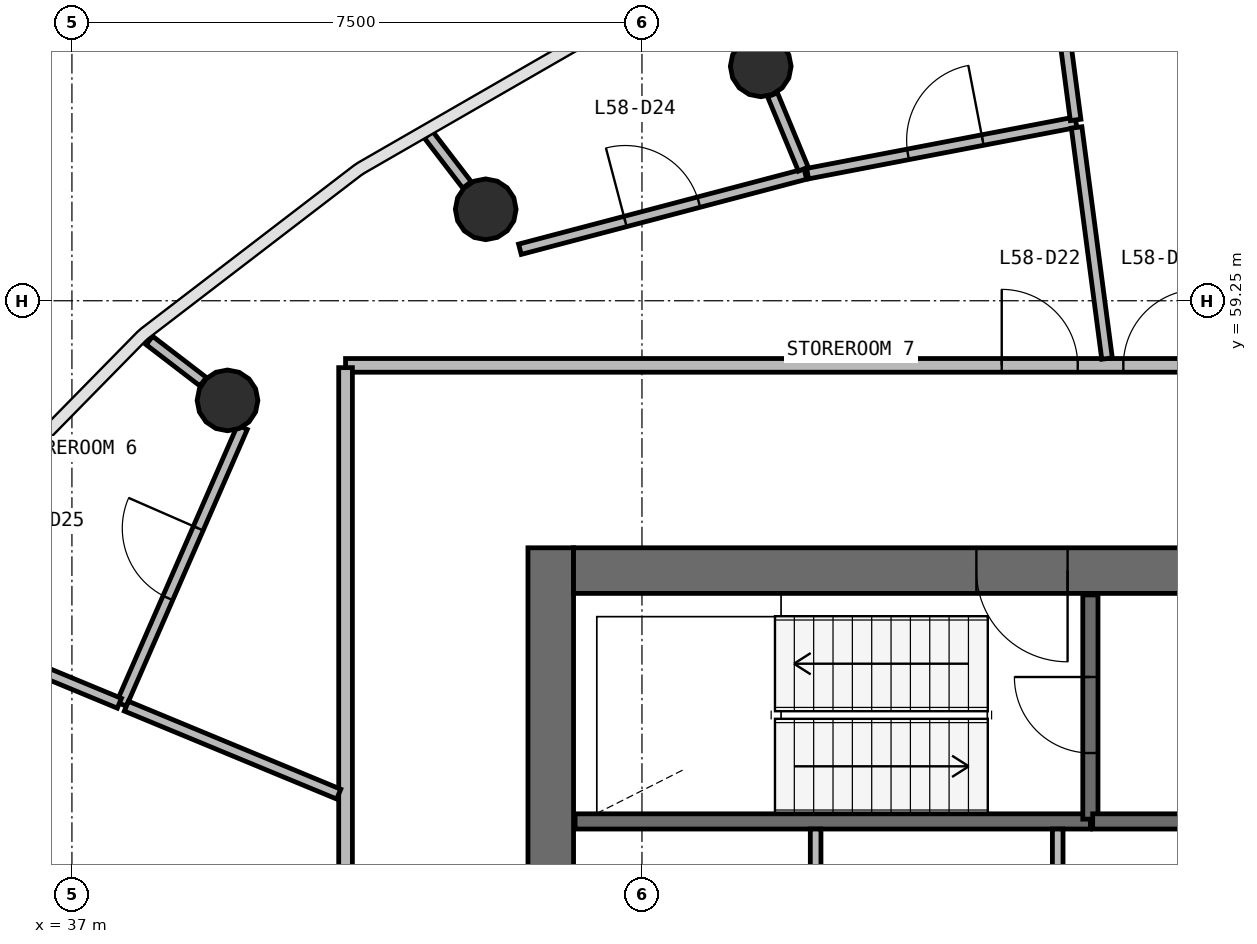
"""IFC4 building model, lengths in metres.
Left out: names, types, materials, properties, quantities, classifications, styles, units other than length and angle.
Written with IfcOpenShell. Run it as: python <this file> out.ifc"""

import sys

from ifc_helpers import new_model, si_unit, direction, frame, frame_2d, origin, origin_2d, place, context, subcontext, project, spatial, rectangle, circle, extrude, source, transform, mapped, element, fill, save


model = new_model("IFC4")
c1 = context("Model", 3, precision=1e-05, world=origin(), true_north=direction((0.0, 1.0)))
c2 = subcontext(c1, "Body", "Model", "MODEL_VIEW")
j1 = project(units=[si_unit("LENGTHUNIT", "METRE"), si_unit("PLANEANGLEUNIT", "RADIAN")], contexts=[c1])
p1 = place(None, origin())
s1 = spatial("IfcSite", under=j1, at=p1, CompositionType="ELEMENT")
p2 = place(p1, origin())
s2 = spatial("IfcBuilding", under=s1, at=p2, CompositionType="ELEMENT")
p3 = place(p2, frame((0.0, 0.0, 238.4)))
s3 = spatial("IfcBuildingStorey", under=s2, at=p3, CompositionType="ELEMENT", Elevation=238.4)
p4 = place(p3, frame((43.3, 56.0, 0.0), z_axis=(0.0, 0.0, 1.0), x_axis=(0.0, -1.0, 0.0)))
e1 = element("IfcWall", 1, at=p4, inside=s3, PredefinedType="SHEAR", context=c2, shape_type="SweptSolid", body=[
    extrude(rectangle(XDim=16.0, YDim=0.6, at=frame_2d((8.0, 0.0))), origin(), (0.0, 0.0, 1.0), 3.9),
])
p5 = place(p4, frame((7.1, 0.0, 0.0)))
e2 = element("IfcOpeningElement", 2, at=p5, cuts=e1, PredefinedType="OPENING", context=c2, shape_type="SweptSolid", body=[
    extrude(rectangle(XDim=1.8, YDim=2.1, at=frame_2d((0.9, 1.05))), frame((0.0, 0.31, 0.0), z_axis=(0.0, -1.0, 0.0), x_axis=(1.0, 0.0, 0.0)), (0.0, 0.0, 1.0), 0.62),
])
p6 = place(p3, frame((60.4, 55.7, 0.0), z_axis=(0.0, 0.0, 1.0), x_axis=(-1.0, 0.0, 0.0)))
e3 = element("IfcWall", 3, at=p6, inside=s3, PredefinedType="SHEAR", context=c2, shape_type="SweptSolid", body=[
    extrude(rectangle(XDim=16.8, YDim=0.6, at=frame_2d((8.4, 0.0))), origin(), (0.0, 0.0, 1.0), 3.9),
])
p7 = place(p6, frame((0.4, 0.0, 0.0)))
e4 = element("IfcOpeningElement", 4, at=p7, cuts=e3, PredefinedType="OPENING", context=c2, shape_type="SweptSolid", body=[
    extrude(rectangle(XDim=1.1, YDim=2.1, at=frame_2d((0.55, 1.05))), frame((0.0, 0.31, 0.0), z_axis=(0.0, -1.0, 0.0), x_axis=(1.0, 0.0, 0.0)), (0.0, 0.0, 1.0), 0.62),
])
p8 = place(p6, frame((10.3, 0.0, 0.0)))
e5 = element("IfcOpeningElement", 5, at=p8, cuts=e3, PredefinedType="OPENING", context=c2, shape_type="SweptSolid", body=[
    extrude(rectangle(XDim=1.2, YDim=2.1, at=frame_2d((0.6, 1.05))), frame((0.0, 0.31, 0.0), z_axis=(0.0, -1.0, 0.0), x_axis=(1.0, 0.0, 0.0)), (0.0, 0.0, 1.0), 0.62),
])
p9 = place(p6, frame((7.25, 0.0, 0.0)))
e6 = element("IfcOpeningElement", 6, at=p9, cuts=e3, PredefinedType="OPENING", context=c2, shape_type="SweptSolid", body=[
    extrude(rectangle(XDim=1.1, YDim=2.1, at=frame_2d((0.55, 1.05))), frame((0.0, 0.31, 0.0), z_axis=(0.0, -1.0, 0.0), x_axis=(1.0, 0.0, 0.0)), (0.0, 0.0, 1.0), 0.62),
])
m1 = source(origin(), c2, "Body", "SweptSolid", [
    extrude(circle(Radius=0.4, at=origin_2d()), origin(), (0.0, 0.0, 1.0), 3.9),
])
for number, where, z_axis, x_axis in (
    (7, (46.063, 62.334, 0.0), (0.0, 0.0, 1.0), (1.0, 0.0, 0.0)),
    (8, (42.444, 60.453, 0.0), (0.0, 0.0, 1.0), (1.0, 0.0, 0.0)),
    (9, (39.047, 57.939, 0.0), (0.0, 0.0, 1.0), (1.0, 0.0, 0.0)),
):
    element("IfcColumn", number, at=place(p3, frame(where, z_axis=z_axis, x_axis=x_axis)), inside=s3, PredefinedType="COLUMN", context=c2, shape_type="MappedRepresentation", body=[
        mapped(m1, transform((0.0, 0.0, 0.0), scale=1.0)),
    ])
p10 = place(p3, frame((43.62, 52.4, 0.0), z_axis=(0.0, 0.0, 1.0), x_axis=(1.0, 0.0, 0.0)))
e10 = element("IfcWall", 10, at=p10, inside=s3, PredefinedType="SOLIDWALL", context=c2, shape_type="SweptSolid", body=[
    extrude(rectangle(XDim=6.78, YDim=0.2, at=frame_2d((3.39, 0.0))), origin(), (0.0, 0.0, 1.0), 3.58),
])
p11 = place(p3, frame((50.4, 52.43, 0.0), z_axis=(0.0, 0.0, 1.0), x_axis=(0.0, 1.0, 0.0)))
e11 = element("IfcWall", 11, at=p11, inside=s3, PredefinedType="SOLIDWALL", context=c2, shape_type="SweptSolid", body=[
    extrude(rectangle(XDim=2.95, YDim=0.2, at=frame_2d((1.475, 0.0))), origin(), (0.0, 0.0, 1.0), 3.58),
])
p12 = place(p11, frame((0.87, 0.0, 0.0)))
e12 = element("IfcOpeningElement", 12, at=p12, cuts=e11, PredefinedType="OPENING", context=c2, shape_type="SweptSolid", body=[
    extrude(rectangle(XDim=1.0, YDim=2.1, at=frame_2d((0.5, 1.05))), frame((0.0, 0.11, 0.0), z_axis=(0.0, -1.0, 0.0), x_axis=(1.0, 0.0, 0.0)), (0.0, 0.0, 1.0), 0.22),
])
p13 = place(p3, frame((50.43, 52.4, 0.0), z_axis=(0.0, 0.0, 1.0), x_axis=(1.0, 0.0, 0.0)))
e13 = element("IfcWall", 13, at=p13, inside=s3, PredefinedType="SOLIDWALL", context=c2, shape_type="SweptSolid", body=[
    extrude(rectangle(XDim=2.24, YDim=0.2, at=frame_2d((1.12, 0.0))), origin(), (0.0, 0.0, 1.0), 3.58),
])
p14 = place(p3, frame((40.6, 58.4, 0.0), z_axis=(0.0, 0.0, 1.0), x_axis=(1.0, 0.0, 0.0)))
e14 = element("IfcWall", 14, at=p14, inside=s3, PredefinedType="PARTITIONING", context=c2, shape_type="SweptSolid", body=[
    extrude(rectangle(XDim=21.483, YDim=0.18, at=frame_2d((10.742, 0.0))), origin(), (0.0, 0.0, 1.0), 2.88),
])
p15 = place(p14, frame((10.233, 0.0, 0.0)))
e15 = element("IfcOpeningElement", 15, at=p15, cuts=e14, PredefinedType="OPENING", context=c2, shape_type="SweptSolid", body=[
    extrude(rectangle(XDim=1.0, YDim=2.1, at=frame_2d((0.5, 1.05))), frame((0.0, 0.1, 0.0), z_axis=(0.0, -1.0, 0.0), x_axis=(1.0, 0.0, 0.0)), (0.0, 0.0, 1.0), 0.2),
])
p16 = place(p14, frame((8.634, 0.0, 0.0)))
e16 = element("IfcOpeningElement", 16, at=p16, cuts=e14, PredefinedType="OPENING", context=c2, shape_type="SweptSolid", body=[
    extrude(rectangle(XDim=1.0, YDim=2.1, at=frame_2d((0.5, 1.05))), frame((0.0, 0.1, 0.0), z_axis=(0.0, -1.0, 0.0), x_axis=(1.0, 0.0, 0.0)), (0.0, 0.0, 1.0), 0.2),
])
p17 = place(p3, frame((40.6, 37.63, 0.0), z_axis=(0.0, 0.0, 1.0), x_axis=(0.0, 1.0, 0.0)))
e17 = element("IfcWall", 17, at=p17, inside=s3, PredefinedType="PARTITIONING", context=c2, shape_type="SweptSolid", body=[
    extrude(rectangle(XDim=20.74, YDim=0.18, at=frame_2d((10.37, 0.0))), origin(), (0.0, 0.0, 1.0), 2.88),
])
p18 = place(p17, frame((9.89, 0.0, 0.0)))
e18 = element("IfcOpeningElement", 18, at=p18, cuts=e17, PredefinedType="OPENING", context=c2, shape_type="SweptSolid", body=[
    extrude(rectangle(XDim=1.0, YDim=2.1, at=frame_2d((0.5, 1.05))), frame((0.0, 0.1, 0.0), z_axis=(0.0, -1.0, 0.0), x_axis=(1.0, 0.0, 0.0)), (0.0, 0.0, 1.0), 0.2),
])
p19 = place(p17, frame((4.29, 0.0, 0.0)))
e19 = element("IfcOpeningElement", 19, at=p19, cuts=e17, PredefinedType="OPENING", context=c2, shape_type="SweptSolid", body=[
    extrude(rectangle(XDim=1.0, YDim=2.1, at=frame_2d((0.5, 1.05))), frame((0.0, 0.1, 0.0), z_axis=(0.0, -1.0, 0.0), x_axis=(1.0, 0.0, 0.0)), (0.0, 0.0, 1.0), 0.2),
])
p20 = place(p3, frame((37.652, 53.943, 0.0), z_axis=(0.0, 0.0, 1.0), x_axis=(0.400345057701, 0.916364466124, 0.0)))
e20 = element("IfcWall", 20, at=p20, inside=s3, PredefinedType="PARTITIONING", context=c2, shape_type="SweptSolid", body=[
    extrude(rectangle(XDim=3.974, YDim=0.14, at=frame_2d((1.987, 0.0))), origin(), (0.0, 0.0, 1.0), 2.88),
])
p21 = place(p20, frame((1.524, 0.0, 0.0)))
e21 = element("IfcOpeningElement", 21, at=p21, cuts=e20, PredefinedType="OPENING", context=c2, shape_type="SweptSolid", body=[
    extrude(rectangle(XDim=1.0, YDim=2.1, at=frame_2d((0.5, 1.05))), frame((0.0, 0.08, 0.0), z_axis=(0.0, -1.0, 0.0), x_axis=(1.0, 0.0, 0.0)), (0.0, 0.0, 1.0), 0.16),
])
p22 = place(p3, frame((42.894, 59.927, 0.0), z_axis=(0.0, 0.0, 1.0), x_axis=(0.967030550889, 0.254660388848, 0.0)))
e22 = element("IfcWall", 22, at=p22, inside=s3, PredefinedType="PARTITIONING", context=c2, shape_type="SweptSolid", body=[
    extrude(rectangle(XDim=3.884, YDim=0.14, at=frame_2d((1.942, 0.0))), origin(), (0.0, 0.0, 1.0), 2.88),
])
p23 = place(p22, frame((1.434, 0.0, 0.0)))
e23 = element("IfcOpeningElement", 23, at=p23, cuts=e22, PredefinedType="OPENING", context=c2, shape_type="SweptSolid", body=[
    extrude(rectangle(XDim=1.0, YDim=2.1, at=frame_2d((0.5, 1.05))), frame((0.0, 0.08, 0.0), z_axis=(0.0, -1.0, 0.0), x_axis=(1.0, 0.0, 0.0)), (0.0, 0.0, 1.0), 0.16),
])
p24 = place(p3, frame((46.679, 60.922, 0.0), z_axis=(0.0, 0.0, 1.0), x_axis=(0.982106581233, 0.188325949088, 0.0)))
e24 = element("IfcWall", 24, at=p24, inside=s3, PredefinedType="PARTITIONING", context=c2, shape_type="SweptSolid", body=[
    extrude(rectangle(XDim=3.595, YDim=0.14, at=frame_2d((1.797, 0.0))), origin(), (0.0, 0.0, 1.0), 2.88),
])
p25 = place(p24, frame((1.345, 0.0, 0.0)))
e25 = element("IfcOpeningElement", 25, at=p25, cuts=e24, PredefinedType="OPENING", context=c2, shape_type="SweptSolid", body=[
    extrude(rectangle(XDim=1.0, YDim=2.1, at=frame_2d((0.5, 1.05))), frame((0.0, 0.08, 0.0), z_axis=(0.0, -1.0, 0.0), x_axis=(1.0, 0.0, 0.0)), (0.0, 0.0, 1.0), 0.16),
])
p26 = place(p3, frame((50.619, 58.49, 0.0), z_axis=(0.0, 0.0, 1.0), x_axis=(-0.130510127223, 0.991446976238, 0.0)))
e26 = element("IfcWall", 26, at=p26, inside=s3, PredefinedType="PARTITIONING", context=c2, shape_type="SweptSolid", body=[
    extrude(rectangle(XDim=3.066, YDim=0.14, at=frame_2d((1.533, 0.0))), origin(), (0.0, 0.0, 1.0), 2.88),
])
p27 = place(p3, frame((40.51, 52.759, 0.0), z_axis=(0.0, 0.0, 1.0), x_axis=(-0.923863305003, 0.382722606687, 0.0)))
e27 = element("IfcWall", 27, at=p27, inside=s3, PredefinedType="PARTITIONING", context=c2, shape_type="SweptSolid", body=[
    extrude(rectangle(XDim=3.024, YDim=0.14, at=frame_2d((1.512, 0.0))), origin(), (0.0, 0.0, 1.0), 2.88),
])
for number, where, z_axis, x_axis in (
    (28, (46.785, 50.01, 0.0), (0.0, 0.0, 1.0), (0.0, 1.0, 0.0)),
    (29, (49.97, 50.01, 0.0), (0.0, 0.0, 1.0), (0.0, 1.0, 0.0)),
):
    element("IfcWall", number, at=place(p3, frame(where, z_axis=z_axis, x_axis=x_axis)), inside=s3, PredefinedType="PARTITIONING", context=c2, shape_type="SweptSolid", body=[
        extrude(rectangle(XDim=2.29, YDim=0.14, at=frame_2d((1.145, 0.0))), origin(), (0.0, 0.0, 1.0), 2.88),
    ])
p28 = place(p3, frame((37.624, 53.955, 0.0), z_axis=(0.0, 0.0, 1.0), x_axis=(-0.923828824713, 0.382805828886, 0.0)))
e30 = element("IfcWall", 30, at=p28, inside=s3, PredefinedType="PARTITIONING", context=c2, shape_type="SweptSolid", body=[
    extrude(rectangle(XDim=1.409, YDim=0.14, at=frame_2d((0.705, 0.0))), origin(), (0.0, 0.0, 1.0), 2.88),
])
p29 = place(p3, frame((50.206, 61.629, 0.0), z_axis=(0.0, 0.0, 1.0), x_axis=(-0.130596609213, 0.991435588257, 0.0)))
e31 = element("IfcWall", 31, at=p29, inside=s3, PredefinedType="PARTITIONING", context=c2, shape_type="SweptSolid", body=[
    extrude(rectangle(XDim=1.378, YDim=0.14, at=frame_2d((0.689, 0.0))), origin(), (0.0, 0.0, 1.0), 2.88),
])
p30 = place(p3, frame((46.623, 60.982, 0.0), z_axis=(0.0, 0.0, 1.0), x_axis=(-0.382698137168, 0.923873441445, 0.0)))
e32 = element("IfcWall", 32, at=p30, inside=s3, PredefinedType="PARTITIONING", context=c2, shape_type="SweptSolid", body=[
    extrude(rectangle(XDim=1.058, YDim=0.14, at=frame_2d((0.529, 0.0))), origin(), (0.0, 0.0, 1.0), 2.88),
])
p31 = place(p3, frame((38.726, 58.186, 0.0), z_axis=(0.0, 0.0, 1.0), x_axis=(-0.793377017635, 0.608730570851, 0.0)))
e33 = element("IfcWall", 33, at=p31, inside=s3, PredefinedType="PARTITIONING", context=c2, shape_type="SweptSolid", body=[
    extrude(rectangle(XDim=0.891, YDim=0.14, at=frame_2d((0.446, 0.0))), origin(), (0.0, 0.0, 1.0), 2.88),
])
p32 = place(p3, frame((42.198, 60.774, 0.0), z_axis=(0.0, 0.0, 1.0), x_axis=(-0.608690039121, 0.793408114576, 0.0)))
e34 = element("IfcWall", 34, at=p32, inside=s3, PredefinedType="PARTITIONING", context=c2, shape_type="SweptSolid", body=[
    extrude(rectangle(XDim=0.833, YDim=0.14, at=frame_2d((0.417, 0.0))), origin(), (0.0, 0.0, 1.0), 2.88),
])
m2 = source(origin(), c2, "Body", "SweptSolid", [
    extrude(rectangle(XDim=1.2, YDim=2.1, at=frame_2d((0.6, 1.05))), frame((0.0, 0.025, 0.0), z_axis=(0.0, -1.0, 0.0), x_axis=(1.0, 0.0, 0.0)), (0.0, 0.0, 1.0), 0.05),
])
p33 = place(p8, origin())
e35 = element("IfcDoor", 35, at=p33, inside=s3, OperationType="SINGLE_SWING_LEFT", PredefinedType="DOOR", context=c2, shape_type="MappedRepresentation", body=[
    mapped(m2, transform((0.0, 0.0, 0.0), scale=1.0)),
])
fill(e5, e35)
m3 = source(origin(), c2, "Body", "SweptSolid", [
    extrude(rectangle(XDim=1.0, YDim=2.1, at=frame_2d((0.5, 1.05))), frame((0.0, 0.025, 0.0), z_axis=(0.0, -1.0, 0.0), x_axis=(1.0, 0.0, 0.0)), (0.0, 0.0, 1.0), 0.05),
])
p34 = place(p12, origin())
e36 = element("IfcDoor", 36, at=p34, inside=s3, OperationType="SINGLE_SWING_RIGHT", PredefinedType="DOOR", context=c2, shape_type="MappedRepresentation", body=[
    mapped(m3, transform((0.0, 0.0, 0.0), scale=1.0)),
])
fill(e12, e36)
m4 = source(origin(), c2, "Body", "SweptSolid", [
    extrude(rectangle(XDim=1.0, YDim=2.1, at=frame_2d((0.5, 1.05))), frame((0.0, 0.025, 0.0), z_axis=(0.0, -1.0, 0.0), x_axis=(1.0, 0.0, 0.0)), (0.0, 0.0, 1.0), 0.05),
])
p35 = place(p15, origin())
e37 = element("IfcDoor", 37, at=p35, inside=s3, OperationType="SINGLE_SWING_RIGHT", PredefinedType="DOOR", context=c2, shape_type="MappedRepresentation", body=[
    mapped(m4, transform((0.0, 0.0, 0.0), scale=1.0)),
])
fill(e15, e37)
p36 = place(p16, origin())
e38 = element("IfcDoor", 38, at=p36, inside=s3, OperationType="SINGLE_SWING_LEFT", PredefinedType="DOOR", context=c2, shape_type="MappedRepresentation", body=[
    mapped(m4, transform((0.0, 0.0, 0.0), scale=1.0)),
])
fill(e16, e38)
p37 = place(p25, origin())
e39 = element("IfcDoor", 39, at=p37, inside=s3, OperationType="SINGLE_SWING_RIGHT", PredefinedType="DOOR", context=c2, shape_type="MappedRepresentation", body=[
    mapped(m4, transform((0.0, 0.0, 0.0), scale=1.0)),
])
fill(e25, e39)
p38 = place(p23, origin())
e40 = element("IfcDoor", 40, at=p38, inside=s3, OperationType="SINGLE_SWING_LEFT", PredefinedType="DOOR", context=c2, shape_type="MappedRepresentation", body=[
    mapped(m4, transform((0.0, 0.0, 0.0), scale=1.0)),
])
fill(e23, e40)
p39 = place(p21, origin())
e41 = element("IfcDoor", 41, at=p39, inside=s3, OperationType="SINGLE_SWING_RIGHT", PredefinedType="DOOR", context=c2, shape_type="MappedRepresentation", body=[
    mapped(m4, transform((0.0, 0.0, 0.0), scale=1.0)),
])
fill(e21, e41)
save(model, sys.argv[1])
